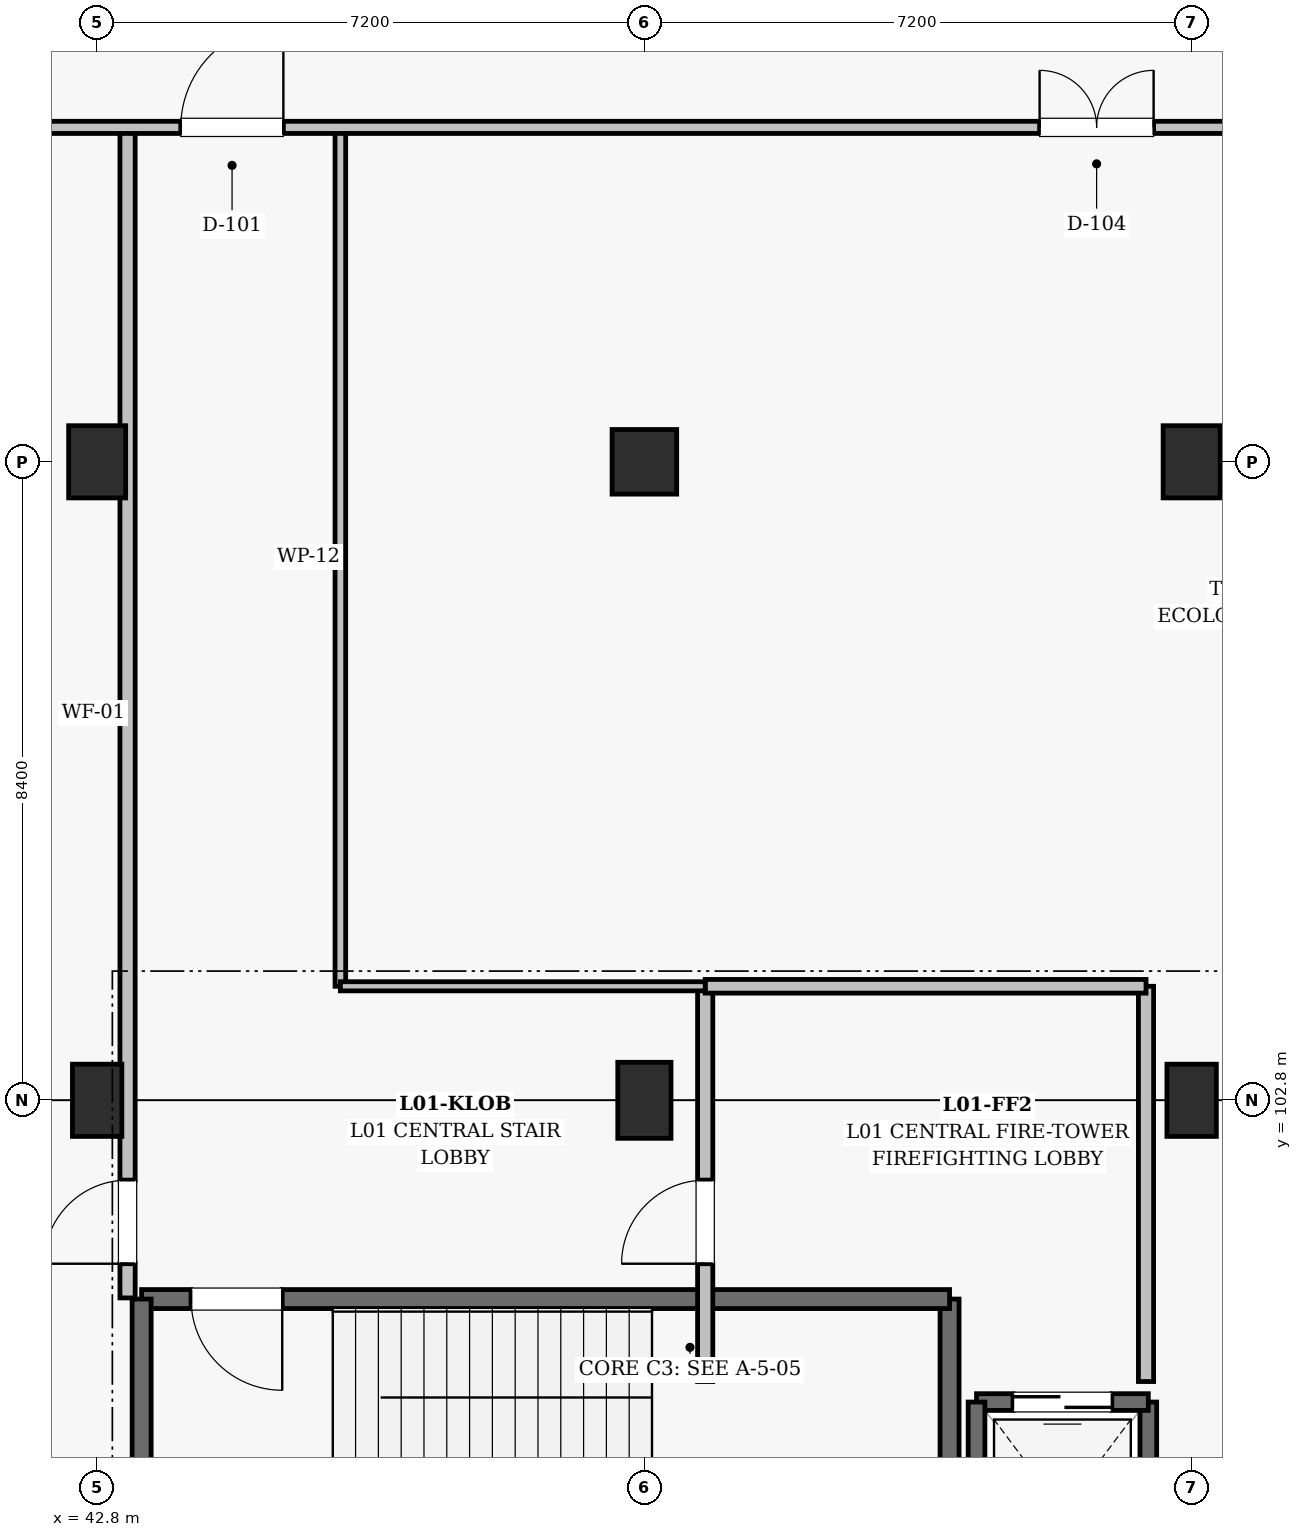
"""IFC4 building model, lengths in metres.
Left out: names, types, materials, properties, quantities, classifications, styles, units other than length and angle.
Written with IfcOpenShell. Run it as: python <this file> out.ifc"""

import sys

from ifc_helpers import new_model, si_unit, direction, frame, frame_2d, origin, origin_2d, place, context, subcontext, project, spatial, rectangle, extrude, element, fill, save


model = new_model("IFC4")
c1 = context("Model", 3, precision=1e-05, world=origin(), true_north=direction((0.0, 1.0)))
c2 = subcontext(c1, "Body", "Model", "MODEL_VIEW")
j1 = project(units=[si_unit("LENGTHUNIT", "METRE"), si_unit("PLANEANGLEUNIT", "RADIAN")], contexts=[c1])
p1 = place(None, origin())
s1 = spatial("IfcSite", under=j1, at=p1, CompositionType="ELEMENT")
p2 = place(p1, origin())
s2 = spatial("IfcBuilding", under=s1, at=p2, CompositionType="ELEMENT")
p3 = place(p2, frame((0.0, 0.0, 5.4)))
s3 = spatial("IfcBuildingStorey", under=s2, at=p3, CompositionType="ELEMENT", Elevation=5.4)
p4 = place(p3, frame((42.8, 102.8, 0.0), z_axis=(0.0, 0.0, 1.0), x_axis=(1.0, 0.0, 0.0)))
e1 = element("IfcColumn", 1, at=p4, inside=s3, PredefinedType="COLUMN", context=c2, shape_type="SweptSolid", body=[
    extrude(rectangle(XDim=0.65, YDim=0.95, at=origin_2d()), origin(), (0.0, 0.0, 1.0), 4.5),
])
p5 = place(p3, frame((42.8, 111.2, 0.0), z_axis=(0.0, 0.0, 1.0), x_axis=(1.0, 0.0, 0.0)))
e2 = element("IfcColumn", 2, at=p5, inside=s3, PredefinedType="COLUMN", context=c2, shape_type="SweptSolid", body=[
    extrude(rectangle(XDim=0.75, YDim=0.95, at=origin_2d()), origin(), (0.0, 0.0, 1.0), 4.5),
])
p6 = place(p3, frame((50.0, 102.8, 0.0), z_axis=(0.0, 0.0, 1.0), x_axis=(1.0, 0.0, 0.0)))
e3 = element("IfcColumn", 3, at=p6, inside=s3, PredefinedType="COLUMN", context=c2, shape_type="SweptSolid", body=[
    extrude(rectangle(XDim=0.7, YDim=1.0, at=origin_2d()), origin(), (0.0, 0.0, 1.0), 4.5),
])
p7 = place(p3, frame((50.0, 111.2, 0.0), z_axis=(0.0, 0.0, 1.0), x_axis=(1.0, 0.0, 0.0)))
e4 = element("IfcColumn", 4, at=p7, inside=s3, PredefinedType="COLUMN", context=c2, shape_type="SweptSolid", body=[
    extrude(rectangle(XDim=0.85, YDim=0.85, at=origin_2d()), origin(), (0.0, 0.0, 1.0), 4.5),
])
p8 = place(p3, frame((57.2, 102.8, 0.0), z_axis=(0.0, 0.0, 1.0), x_axis=(1.0, 0.0, 0.0)))
e5 = element("IfcColumn", 5, at=p8, inside=s3, PredefinedType="COLUMN", context=c2, shape_type="SweptSolid", body=[
    extrude(rectangle(XDim=0.65, YDim=0.95, at=origin_2d()), origin(), (0.0, 0.0, 1.0), 4.5),
])
p9 = place(p3, frame((57.2, 111.2, 0.0), z_axis=(0.0, 0.0, 1.0), x_axis=(1.0, 0.0, 0.0)))
e6 = element("IfcColumn", 6, at=p9, inside=s3, PredefinedType="COLUMN", context=c2, shape_type="SweptSolid", body=[
    extrude(rectangle(XDim=0.75, YDim=0.95, at=origin_2d()), origin(), (0.0, 0.0, 1.0), 4.5),
])
p10 = place(p3, frame((54.015, 95.085, 0.0), z_axis=(0.0, 0.0, 1.0), x_axis=(0.0, 1.0, 0.0)))
e7 = element("IfcWall", 7, at=p10, inside=s3, PredefinedType="SHEAR", context=c2, shape_type="SweptSolid", body=[
    extrude(rectangle(XDim=5.1, YDim=0.25, at=frame_2d((2.55, 0.0))), origin(), (0.0, 0.0, 1.0), 4.215),
])
p11 = place(p3, frame((54.015, 100.185, 0.0), z_axis=(0.0, 0.0, 1.0), x_axis=(-1.0, 0.0, 0.0)))
e8 = element("IfcWall", 8, at=p11, inside=s3, PredefinedType="SHEAR", context=c2, shape_type="SweptSolid", body=[
    extrude(rectangle(XDim=10.63, YDim=0.25, at=frame_2d((5.315, 0.0))), origin(), (0.0, 0.0, 1.0), 4.215),
])
p12 = place(p11, frame((8.78, 0.0, 0.0)))
e9 = element("IfcOpeningElement", 9, at=p12, cuts=e8, PredefinedType="OPENING", context=c2, shape_type="SweptSolid", body=[
    extrude(rectangle(XDim=1.2, YDim=2.15, at=frame_2d((0.6, 1.075))), frame((0.0, 0.135, 0.0), z_axis=(0.0, -1.0, 0.0), x_axis=(1.0, 0.0, 0.0)), (0.0, 0.0, 1.0), 0.27),
])
p13 = place(p3, frame((43.385, 100.185, 0.0), z_axis=(0.0, 0.0, 1.0), x_axis=(0.0, -1.0, 0.0)))
e10 = element("IfcWall", 10, at=p13, inside=s3, PredefinedType="SHEAR", context=c2, shape_type="SweptSolid", body=[
    extrude(rectangle(XDim=5.1, YDim=0.25, at=frame_2d((2.55, 0.0))), origin(), (0.0, 0.0, 1.0), 4.215),
])
p14 = place(p3, frame((56.63, 95.97, 0.0), z_axis=(0.0, 0.0, 1.0), x_axis=(0.0, 1.0, 0.0)))
e11 = element("IfcWall", 11, at=p14, inside=s3, PredefinedType="SHEAR", context=c2, shape_type="SweptSolid", body=[
    extrude(rectangle(XDim=2.86, YDim=0.22, at=frame_2d((1.43, 0.0))), origin(), (0.0, 0.0, 1.0), 4.215),
])
p15 = place(p3, frame((56.63, 98.83, 0.0), z_axis=(0.0, 0.0, 1.0), x_axis=(-1.0, 0.0, 0.0)))
e12 = element("IfcWall", 12, at=p15, inside=s3, PredefinedType="SHEAR", context=c2, shape_type="SweptSolid", body=[
    extrude(rectangle(XDim=2.26, YDim=0.22, at=frame_2d((1.13, 0.0))), origin(), (0.0, 0.0, 1.0), 4.215),
])
p16 = place(p15, frame((0.48, 0.0, 0.0)))
e13 = element("IfcOpeningElement", 13, at=p16, cuts=e12, PredefinedType="OPENING", context=c2, shape_type="SweptSolid", body=[
    extrude(rectangle(XDim=1.3, YDim=2.2, at=frame_2d((0.65, 1.1))), frame((0.0, 0.12, 0.0), z_axis=(0.0, -1.0, 0.0), x_axis=(1.0, 0.0, 0.0)), (0.0, 0.0, 1.0), 0.24),
])
p17 = place(p3, frame((54.37, 98.83, 0.0), z_axis=(0.0, 0.0, 1.0), x_axis=(0.0, -1.0, 0.0)))
e14 = element("IfcWall", 14, at=p17, inside=s3, PredefinedType="SHEAR", context=c2, shape_type="SweptSolid", body=[
    extrude(rectangle(XDim=2.86, YDim=0.22, at=frame_2d((1.43, 0.0))), origin(), (0.0, 0.0, 1.0), 4.215),
])
p18 = place(p3, frame((50.8, 99.1, 0.0), z_axis=(0.0, 0.0, 1.0), x_axis=(0.0, 1.0, 0.0)))
e15 = element("IfcWall", 15, at=p18, inside=s3, PredefinedType="SOLIDWALL", context=c2, shape_type="SweptSolid", body=[
    extrude(rectangle(XDim=5.2, YDim=0.2, at=frame_2d((2.6, 0.0))), origin(), (0.0, 0.0, 1.0), 3.36),
])
p19 = place(p18, frame((1.55, 0.0, 0.0)))
e16 = element("IfcOpeningElement", 16, at=p19, cuts=e15, PredefinedType="OPENING", context=c2, shape_type="SweptSolid", body=[
    extrude(rectangle(XDim=1.1, YDim=2.15, at=frame_2d((0.55, 1.075))), frame((0.0, 0.11, 0.0), z_axis=(0.0, -1.0, 0.0), x_axis=(1.0, 0.0, 0.0)), (0.0, 0.0, 1.0), 0.22),
])
p20 = place(p3, frame((56.6, 99.1, 0.0), z_axis=(0.0, 0.0, 1.0), x_axis=(0.0, 1.0, 0.0)))
e17 = element("IfcWall", 17, at=p20, inside=s3, PredefinedType="SOLIDWALL", context=c2, shape_type="SweptSolid", body=[
    extrude(rectangle(XDim=5.2, YDim=0.2, at=frame_2d((2.6, 0.0))), origin(), (0.0, 0.0, 1.0), 3.36),
])
p21 = place(p3, frame((50.8, 104.3, 0.0), z_axis=(0.0, 0.0, 1.0), x_axis=(1.0, 0.0, 0.0)))
e18 = element("IfcWall", 18, at=p21, inside=s3, PredefinedType="SOLIDWALL", context=c2, shape_type="SweptSolid", body=[
    extrude(rectangle(XDim=5.8, YDim=0.18, at=frame_2d((2.9, 0.0))), origin(), (0.0, 0.0, 1.0), 3.56),
])
p22 = place(p3, frame((43.2, 100.2, 0.0), z_axis=(0.0, 0.0, 1.0), x_axis=(0.0, 1.0, 0.0)))
e19 = element("IfcWall", 19, at=p22, inside=s3, PredefinedType="SOLIDWALL", context=c2, shape_type="SweptSolid", body=[
    extrude(rectangle(XDim=15.4, YDim=0.2, at=frame_2d((7.7, 0.0))), origin(), (0.0, 0.0, 1.0), 2.96),
])
p23 = place(p22, frame((0.45, 0.0, 0.0)))
e20 = element("IfcOpeningElement", 20, at=p23, cuts=e19, PredefinedType="OPENING", context=c2, shape_type="SweptSolid", body=[
    extrude(rectangle(XDim=1.1, YDim=2.15, at=frame_2d((0.55, 1.075))), frame((0.0, 0.11, 0.0), z_axis=(0.0, -1.0, 0.0), x_axis=(1.0, 0.0, 0.0)), (0.0, 0.0, 1.0), 0.22),
])
p24 = place(p3, frame((46.0, 104.3, 0.0), z_axis=(0.0, 0.0, 1.0), x_axis=(0.0, 1.0, 0.0)))
e21 = element("IfcWall", 21, at=p24, inside=s3, PredefinedType="PARTITIONING", context=c2, shape_type="SweptSolid", body=[
    extrude(rectangle(XDim=11.3, YDim=0.14, at=frame_2d((5.65, 0.0))), origin(), (0.0, 0.0, 1.0), 3.52),
])
p25 = place(p3, frame((46.0, 104.3, 0.0), z_axis=(0.0, 0.0, 1.0), x_axis=(1.0, 0.0, 0.0)))
e22 = element("IfcWall", 22, at=p25, inside=s3, PredefinedType="PARTITIONING", context=c2, shape_type="SweptSolid", body=[
    extrude(rectangle(XDim=4.8, YDim=0.12, at=frame_2d((2.4, 0.0))), origin(), (0.0, 0.0, 1.0), 3.31),
])
p26 = place(p3, frame((14.0, 115.6, 0.0), z_axis=(0.0, 0.0, 1.0), x_axis=(1.0, 0.0, 0.0)))
e23 = element("IfcWall", 23, at=p26, inside=s3, PredefinedType="PARTITIONING", context=c2, shape_type="SweptSolid", body=[
    extrude(rectangle(XDim=100.8, YDim=0.16, at=frame_2d((50.4, 0.0))), origin(), (0.0, 0.0, 1.0), 2.96),
])
p27 = place(p26, frame((29.9, 0.0, 0.0)))
e24 = element("IfcOpeningElement", 24, at=p27, cuts=e23, PredefinedType="OPENING", context=c2, shape_type="SweptSolid", body=[
    extrude(rectangle(XDim=1.35, YDim=2.2, at=frame_2d((0.675, 1.1))), frame((0.0, 0.09, 0.0), z_axis=(0.0, -1.0, 0.0), x_axis=(1.0, 0.0, 0.0)), (0.0, 0.0, 1.0), 0.18),
])
p28 = place(p26, frame((7.4, 0.0, 0.0)))
e25 = element("IfcOpeningElement", 25, at=p28, cuts=e23, PredefinedType="OPENING", context=c2, shape_type="SweptSolid", body=[
    extrude(rectangle(XDim=1.5, YDim=2.25, at=frame_2d((0.75, 1.125))), frame((0.0, 0.09, 0.0), z_axis=(0.0, -1.0, 0.0), x_axis=(1.0, 0.0, 0.0)), (0.0, 0.0, 1.0), 0.18),
])
p29 = place(p26, frame((23.8, 0.0, 0.0)))
e26 = element("IfcOpeningElement", 26, at=p29, cuts=e23, PredefinedType="OPENING", context=c2, shape_type="SweptSolid", body=[
    extrude(rectangle(XDim=1.5, YDim=2.25, at=frame_2d((0.75, 1.125))), frame((0.0, 0.09, 0.0), z_axis=(0.0, -1.0, 0.0), x_axis=(1.0, 0.0, 0.0)), (0.0, 0.0, 1.0), 0.18),
])
p30 = place(p26, frame((41.2, 0.0, 0.0)))
e27 = element("IfcOpeningElement", 27, at=p30, cuts=e23, PredefinedType="OPENING", context=c2, shape_type="SweptSolid", body=[
    extrude(rectangle(XDim=1.5, YDim=2.25, at=frame_2d((0.75, 1.125))), frame((0.0, 0.09, 0.0), z_axis=(0.0, -1.0, 0.0), x_axis=(1.0, 0.0, 0.0)), (0.0, 0.0, 1.0), 0.18),
])
p31 = place(p26, frame((59.4, 0.0, 0.0)))
e28 = element("IfcOpeningElement", 28, at=p31, cuts=e23, PredefinedType="OPENING", context=c2, shape_type="SweptSolid", body=[
    extrude(rectangle(XDim=1.5, YDim=2.25, at=frame_2d((0.75, 1.125))), frame((0.0, 0.09, 0.0), z_axis=(0.0, -1.0, 0.0), x_axis=(1.0, 0.0, 0.0)), (0.0, 0.0, 1.0), 0.18),
])
p32 = place(p26, frame((77.4, 0.0, 0.0)))
e29 = element("IfcOpeningElement", 29, at=p32, cuts=e23, PredefinedType="OPENING", context=c2, shape_type="SweptSolid", body=[
    extrude(rectangle(XDim=1.5, YDim=2.25, at=frame_2d((0.75, 1.125))), frame((0.0, 0.09, 0.0), z_axis=(0.0, -1.0, 0.0), x_axis=(1.0, 0.0, 0.0)), (0.0, 0.0, 1.0), 0.18),
])
p33 = place(p26, frame((95.4, 0.0, 0.0)))
e30 = element("IfcOpeningElement", 30, at=p33, cuts=e23, PredefinedType="OPENING", context=c2, shape_type="SweptSolid", body=[
    extrude(rectangle(XDim=1.45, YDim=2.2, at=frame_2d((0.725, 1.1))), frame((0.0, 0.09, 0.0), z_axis=(0.0, -1.0, 0.0), x_axis=(1.0, 0.0, 0.0)), (0.0, 0.0, 1.0), 0.18),
])
p34 = place(p12, origin())
e31 = element("IfcDoor", 31, at=p34, inside=s3, OperationType="SINGLE_SWING_LEFT", PredefinedType="DOOR", context=c2, shape_type="SweptSolid", body=[
    extrude(rectangle(XDim=1.2, YDim=2.15, at=frame_2d((0.6, 1.075))), frame((0.0, 0.025, 0.0), z_axis=(0.0, -1.0, 0.0), x_axis=(1.0, 0.0, 0.0)), (0.0, 0.0, 1.0), 0.05),
])
fill(e9, e31)
p35 = place(p16, origin())
e32 = element("IfcDoor", 32, at=p35, inside=s3, OperationType="DOUBLE_DOOR_SLIDING", PredefinedType="DOOR", context=c2, shape_type="SweptSolid", body=[
    extrude(rectangle(XDim=1.3, YDim=2.2, at=frame_2d((0.65, 1.1))), frame((0.0, 0.025, 0.0), z_axis=(0.0, -1.0, 0.0), x_axis=(1.0, 0.0, 0.0)), (0.0, 0.0, 1.0), 0.05),
])
fill(e13, e32)
p36 = place(p19, origin())
e33 = element("IfcDoor", 33, at=p36, inside=s3, OperationType="SINGLE_SWING_LEFT", PredefinedType="DOOR", context=c2, shape_type="SweptSolid", body=[
    extrude(rectangle(XDim=1.1, YDim=2.15, at=frame_2d((0.55, 1.075))), frame((0.0, 0.025, 0.0), z_axis=(0.0, -1.0, 0.0), x_axis=(1.0, 0.0, 0.0)), (0.0, 0.0, 1.0), 0.05),
])
fill(e16, e33)
p37 = place(p23, origin())
e34 = element("IfcDoor", 34, at=p37, inside=s3, OperationType="SINGLE_SWING_LEFT", PredefinedType="DOOR", context=c2, shape_type="SweptSolid", body=[
    extrude(rectangle(XDim=1.1, YDim=2.15, at=frame_2d((0.55, 1.075))), frame((0.0, 0.025, 0.0), z_axis=(0.0, -1.0, 0.0), x_axis=(1.0, 0.0, 0.0)), (0.0, 0.0, 1.0), 0.05),
])
fill(e20, e34)
p38 = place(p27, origin())
e35 = element("IfcDoor", 35, at=p38, inside=s3, OperationType="SINGLE_SWING_RIGHT", PredefinedType="DOOR", context=c2, shape_type="SweptSolid", body=[
    extrude(rectangle(XDim=1.35, YDim=2.2, at=frame_2d((0.675, 1.1))), frame((0.0, 0.025, 0.0), z_axis=(0.0, -1.0, 0.0), x_axis=(1.0, 0.0, 0.0)), (0.0, 0.0, 1.0), 0.05),
])
fill(e24, e35)
p39 = place(p30, origin())
e36 = element("IfcDoor", 36, at=p39, inside=s3, OperationType="DOUBLE_DOOR_SINGLE_SWING", PredefinedType="DOOR", context=c2, shape_type="SweptSolid", body=[
    extrude(rectangle(XDim=1.5, YDim=2.25, at=frame_2d((0.75, 1.125))), frame((0.0, 0.025, 0.0), z_axis=(0.0, -1.0, 0.0), x_axis=(1.0, 0.0, 0.0)), (0.0, 0.0, 1.0), 0.05),
])
fill(e27, e36)
save(model, sys.argv[1])
